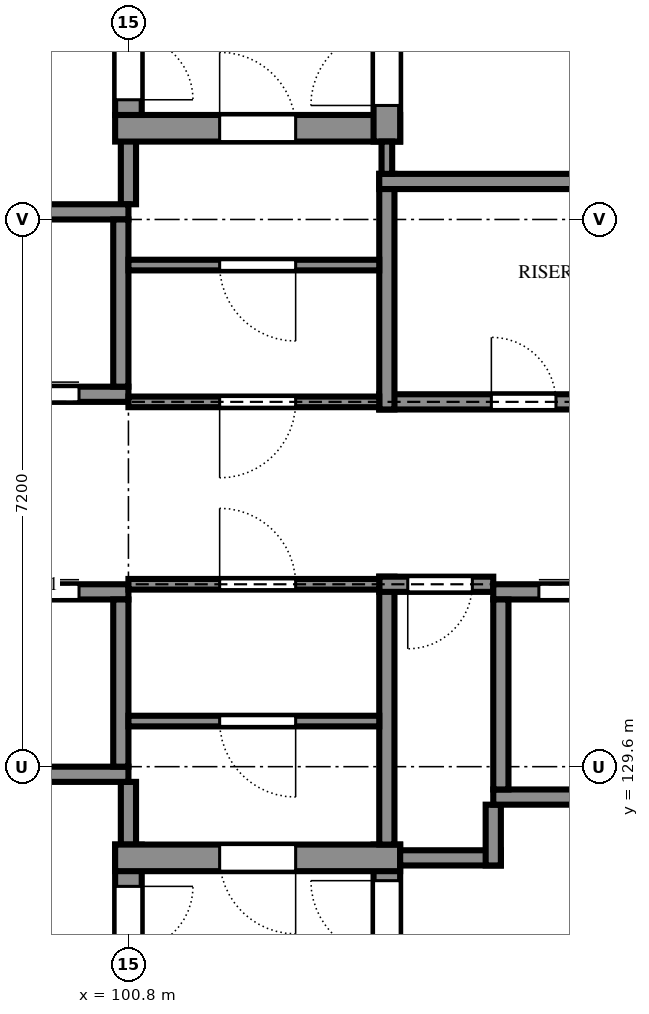
"""IFC4 building model, lengths in metres.
Left out: names, types, materials, properties, quantities, classifications, styles, units other than length and angle.
Written with IfcOpenShell. Run it as: python <this file> out.ifc"""

import sys

from ifc_helpers import new_model, si_unit, direction, frame, frame_2d, origin, place, context, subcontext, project, spatial, rectangle, extrude, element, fill, save


model = new_model("IFC4")
c1 = context("Model", 3, precision=1e-05, world=origin(), true_north=direction((0.0, 1.0)))
c2 = subcontext(c1, "Body", "Model", "MODEL_VIEW")
j1 = project(units=[si_unit("LENGTHUNIT", "METRE"), si_unit("PLANEANGLEUNIT", "RADIAN")], contexts=[c1])
p1 = place(None, origin())
s1 = spatial("IfcSite", under=j1, at=p1, CompositionType="ELEMENT")
p2 = place(p1, origin())
s2 = spatial("IfcBuilding", under=s1, at=p2, CompositionType="ELEMENT")
p3 = place(p2, frame((0.0, 0.0, 21.6)))
s3 = spatial("IfcBuildingStorey", under=s2, at=p3, CompositionType="ELEMENT", Elevation=21.6)
p4 = place(p3, frame((104.2, 125.1, 0.0), z_axis=(0.0, 0.0, 1.0), x_axis=(0.0, 1.0, 0.0)))
e1 = element("IfcWall", 1, at=p4, inside=s3, PredefinedType="SHEAR", context=c2, shape_type="SweptSolid", body=[
    extrude(rectangle(XDim=3.475, YDim=0.35, at=frame_2d((1.737, 0.0))), origin(), (0.0, 0.0, 1.0), 3.6),
])
p5 = place(p4, frame((2.0, 0.0, 0.0)))
e2 = element("IfcOpeningElement", 2, at=p5, cuts=e1, PredefinedType="OPENING", context=c2, shape_type="SweptSolid", body=[
    extrude(rectangle(XDim=1.0, YDim=2.1, at=frame_2d((0.5, 1.05))), frame((0.0, 0.185, 0.0), z_axis=(0.0, -1.0, 0.0), x_axis=(1.0, 0.0, 0.0)), (0.0, 0.0, 1.0), 0.37),
])
p6 = place(p3, frame((100.8, 128.575, 0.0), z_axis=(0.0, 0.0, 1.0), x_axis=(0.0, -1.0, 0.0)))
e3 = element("IfcWall", 3, at=p6, inside=s3, PredefinedType="SHEAR", context=c2, shape_type="SweptSolid", body=[
    extrude(rectangle(XDim=6.35, YDim=0.35, at=frame_2d((3.175, 0.0))), origin(), (0.0, 0.0, 1.0), 3.6),
])
p7 = place(p6, frame((0.55, 0.0, 0.0)))
e4 = element("IfcOpeningElement", 4, at=p7, cuts=e3, PredefinedType="OPENING", context=c2, shape_type="SweptSolid", body=[
    extrude(rectangle(XDim=0.85, YDim=2.1, at=frame_2d((0.425, 1.05))), frame((0.0, 0.185, 0.0), z_axis=(0.0, -1.0, 0.0), x_axis=(1.0, 0.0, 0.0)), (0.0, 0.0, 1.0), 0.37),
])
p8 = place(p3, frame((100.8, 128.575, 0.0), z_axis=(0.0, 0.0, 1.0), x_axis=(0.0, 1.0, 0.0)))
e5 = element("IfcWall", 5, at=p8, inside=s3, PredefinedType="SHEAR", context=c2, shape_type="SweptSolid", body=[
    extrude(rectangle(XDim=0.825, YDim=0.2, at=frame_2d((0.413, 0.0))), origin(), (0.0, 0.0, 1.0), 3.6),
])
p9 = place(p3, frame((104.375, 128.4, 0.0), z_axis=(0.0, 0.0, 1.0), x_axis=(-1.0, 0.0, 0.0)))
e6 = element("IfcWall", 6, at=p9, inside=s3, PredefinedType="SHEAR", context=c2, shape_type="SweptSolid", body=[
    extrude(rectangle(XDim=3.75, YDim=0.35, at=frame_2d((1.875, 0.0))), origin(), (0.0, 0.0, 1.0), 3.6),
])
p10 = place(p9, frame((1.375, 0.0, 0.0)))
e7 = element("IfcOpeningElement", 7, at=p10, cuts=e6, PredefinedType="OPENING", context=c2, shape_type="SweptSolid", body=[
    extrude(rectangle(XDim=1.0, YDim=2.1, at=frame_2d((0.5, 1.05))), frame((0.0, 0.185, 0.0), z_axis=(0.0, -1.0, 0.0), x_axis=(1.0, 0.0, 0.0)), (0.0, 0.0, 1.0), 0.37),
])
p11 = place(p3, frame((104.375, 128.4, 0.0), z_axis=(0.0, 0.0, 1.0), x_axis=(1.0, 0.0, 0.0)))
e8 = element("IfcWall", 8, at=p11, inside=s3, PredefinedType="SHEAR", context=c2, shape_type="SweptSolid", body=[
    extrude(rectangle(XDim=1.325, YDim=0.2, at=frame_2d((0.663, 0.0))), origin(), (0.0, 0.0, 1.0), 3.6),
])
p12 = place(p3, frame((105.6, 128.3, 0.0), z_axis=(0.0, 0.0, 1.0), x_axis=(0.0, 1.0, 0.0)))
e9 = element("IfcWall", 9, at=p12, inside=s3, PredefinedType="SHEAR", context=c2, shape_type="SweptSolid", body=[
    extrude(rectangle(XDim=0.8, YDim=0.2, at=frame_2d((0.4, 0.0))), origin(), (0.0, 0.0, 1.0), 3.6),
])
p13 = place(p3, frame((104.2, 132.1, 0.0), z_axis=(0.0, 0.0, 1.0), x_axis=(0.0, -1.0, 0.0)))
e10 = element("IfcWall", 10, at=p13, inside=s3, PredefinedType="SHEAR", context=c2, shape_type="SweptSolid", body=[
    extrude(rectangle(XDim=3.525, YDim=0.2, at=frame_2d((1.763, 0.0))), origin(), (0.0, 0.0, 1.0), 3.6),
])
p14 = place(p3, frame((105.6, 132.0, 0.0), z_axis=(0.0, 0.0, 1.0), x_axis=(-1.0, 0.0, 0.0)))
e11 = element("IfcWall", 11, at=p14, inside=s3, PredefinedType="SHEAR", context=c2, shape_type="SweptSolid", body=[
    extrude(rectangle(XDim=1.5, YDim=0.2, at=frame_2d((0.75, 0.0))), origin(), (0.0, 0.0, 1.0), 3.6),
])
p15 = place(p14, frame((0.275, 0.0, 0.0)))
e12 = element("IfcOpeningElement", 12, at=p15, cuts=e11, PredefinedType="OPENING", context=c2, shape_type="SweptSolid", body=[
    extrude(rectangle(XDim=0.85, YDim=2.1, at=frame_2d((0.425, 1.05))), frame((0.0, 0.11, 0.0), z_axis=(0.0, -1.0, 0.0), x_axis=(1.0, 0.0, 0.0)), (0.0, 0.0, 1.0), 0.22),
])
p16 = place(p3, frame((104.1, 134.4, 0.0), z_axis=(0.0, 0.0, 1.0), x_axis=(1.0, 0.0, 0.0)))
e13 = element("IfcWall", 13, at=p16, inside=s3, PredefinedType="SHEAR", context=c2, shape_type="SweptSolid", body=[
    extrude(rectangle(XDim=4.1, YDim=0.2, at=frame_2d((2.05, 0.0))), origin(), (0.0, 0.0, 1.0), 3.6),
])
p17 = place(p16, frame((1.475, 0.0, 0.0)))
e14 = element("IfcOpeningElement", 14, at=p17, cuts=e13, PredefinedType="OPENING", context=c2, shape_type="SweptSolid", body=[
    extrude(rectangle(XDim=0.85, YDim=2.1, at=frame_2d((0.425, 1.05))), frame((0.0, 0.11, 0.0), z_axis=(0.0, -1.0, 0.0), x_axis=(1.0, 0.0, 0.0)), (0.0, 0.0, 1.0), 0.22),
])
p18 = place(p3, frame((100.8, 137.0, 0.0), z_axis=(0.0, 0.0, 1.0), x_axis=(0.0, 1.0, 0.0)))
e15 = element("IfcWall", 15, at=p18, inside=s3, PredefinedType="SHEAR", context=c2, shape_type="SweptSolid", body=[
    extrude(rectangle(XDim=1.175, YDim=0.2, at=frame_2d((0.587, 0.0))), origin(), (0.0, 0.0, 1.0), 3.6),
])
p19 = place(p3, frame((104.2, 137.4, 0.0), z_axis=(0.0, 0.0, 1.0), x_axis=(0.0, -1.0, 0.0)))
e16 = element("IfcWall", 16, at=p19, inside=s3, PredefinedType="SHEAR", context=c2, shape_type="SweptSolid", body=[
    extrude(rectangle(XDim=3.1, YDim=0.2, at=frame_2d((1.55, 0.0))), origin(), (0.0, 0.0, 1.0), 3.6),
])
p20 = place(p3, frame((108.2, 137.3, 0.0), z_axis=(0.0, 0.0, 1.0), x_axis=(-1.0, 0.0, 0.0)))
e17 = element("IfcWall", 17, at=p20, inside=s3, PredefinedType="SHEAR", context=c2, shape_type="SweptSolid", body=[
    extrude(rectangle(XDim=4.1, YDim=0.2, at=frame_2d((2.05, 0.0))), origin(), (0.0, 0.0, 1.0), 3.6),
])
p21 = place(p3, frame((100.625, 138.0, 0.0), z_axis=(0.0, 0.0, 1.0), x_axis=(1.0, 0.0, 0.0)))
e18 = element("IfcWall", 18, at=p21, inside=s3, PredefinedType="SHEAR", context=c2, shape_type="SweptSolid", body=[
    extrude(rectangle(XDim=3.75, YDim=0.35, at=frame_2d((1.875, 0.0))), origin(), (0.0, 0.0, 1.0), 3.6),
])
p22 = place(p21, frame((1.375, 0.0, 0.0)))
e19 = element("IfcOpeningElement", 19, at=p22, cuts=e18, PredefinedType="OPENING", context=c2, shape_type="SweptSolid", body=[
    extrude(rectangle(XDim=1.0, YDim=2.1, at=frame_2d((0.5, 1.05))), frame((0.0, 0.185, 0.0), z_axis=(0.0, -1.0, 0.0), x_axis=(1.0, 0.0, 0.0)), (0.0, 0.0, 1.0), 0.37),
])
p23 = place(p3, frame((104.2, 137.825, 0.0), z_axis=(0.0, 0.0, 1.0), x_axis=(0.0, 1.0, 0.0)))
e20 = element("IfcWall", 20, at=p23, inside=s3, PredefinedType="SHEAR", context=c2, shape_type="SweptSolid", body=[
    extrude(rectangle(XDim=3.475, YDim=0.35, at=frame_2d((1.738, 0.0))), origin(), (0.0, 0.0, 1.0), 3.6),
])
p24 = place(p23, frame((0.475, 0.0, 0.0)))
e21 = element("IfcOpeningElement", 21, at=p24, cuts=e20, PredefinedType="OPENING", context=c2, shape_type="SweptSolid", body=[
    extrude(rectangle(XDim=1.0, YDim=2.1, at=frame_2d((0.5, 1.05))), frame((0.0, 0.185, 0.0), z_axis=(0.0, -1.0, 0.0), x_axis=(1.0, 0.0, 0.0)), (0.0, 0.0, 1.0), 0.37),
])
p25 = place(p3, frame((100.8, 144.175, 0.0), z_axis=(0.0, 0.0, 1.0), x_axis=(0.0, -1.0, 0.0)))
e22 = element("IfcWall", 22, at=p25, inside=s3, PredefinedType="SHEAR", context=c2, shape_type="SweptSolid", body=[
    extrude(rectangle(XDim=6.0, YDim=0.35, at=frame_2d((3.0, 0.0))), origin(), (0.0, 0.0, 1.0), 3.6),
])
p26 = place(p25, frame((4.95, 0.0, 0.0)))
e23 = element("IfcOpeningElement", 23, at=p26, cuts=e22, PredefinedType="OPENING", context=c2, shape_type="SweptSolid", body=[
    extrude(rectangle(XDim=0.85, YDim=2.1, at=frame_2d((0.425, 1.05))), frame((0.0, 0.185, 0.0), z_axis=(0.0, -1.0, 0.0), x_axis=(1.0, 0.0, 0.0)), (0.0, 0.0, 1.0), 0.37),
])
p27 = place(p3, frame((98.4, 129.5, 0.0), z_axis=(0.0, 0.0, 1.0), x_axis=(1.0, 0.0, 0.0)))
e24 = element("IfcWall", 24, at=p27, inside=s3, PredefinedType="SHEAR", context=c2, shape_type="SweptSolid", body=[
    extrude(rectangle(XDim=2.4, YDim=0.2, at=frame_2d((1.2, 0.0))), origin(), (0.0, 0.0, 1.0), 3.6),
])
p28 = place(p3, frame((98.4, 131.9, 0.0), z_axis=(0.0, 0.0, 1.0), x_axis=(1.0, 0.0, 0.0)))
e25 = element("IfcWall", 25, at=p28, inside=s3, PredefinedType="SHEAR", context=c2, shape_type="SweptSolid", body=[
    extrude(rectangle(XDim=2.4, YDim=0.2, at=frame_2d((1.2, 0.0))), origin(), (0.0, 0.0, 1.0), 3.6),
])
p29 = place(p28, frame((0.65, 0.0, 0.0)))
e26 = element("IfcOpeningElement", 26, at=p29, cuts=e25, PredefinedType="OPENING", context=c2, shape_type="SweptSolid", body=[
    extrude(rectangle(XDim=1.1, YDim=2.1, at=frame_2d((0.55, 1.05))), frame((0.0, 0.11, 0.0), z_axis=(0.0, -1.0, 0.0), x_axis=(1.0, 0.0, 0.0)), (0.0, 0.0, 1.0), 0.22),
])
p30 = place(p3, frame((100.7, 129.6, 0.0), z_axis=(0.0, 0.0, 1.0), x_axis=(0.0, 1.0, 0.0)))
e27 = element("IfcWall", 27, at=p30, inside=s3, PredefinedType="SHEAR", context=c2, shape_type="SweptSolid", body=[
    extrude(rectangle(XDim=2.2, YDim=0.2, at=frame_2d((1.1, 0.0))), origin(), (0.0, 0.0, 1.0), 3.6),
])
p31 = place(p3, frame((98.4, 134.5, 0.0), z_axis=(0.0, 0.0, 1.0), x_axis=(1.0, 0.0, 0.0)))
e28 = element("IfcWall", 28, at=p31, inside=s3, PredefinedType="SHEAR", context=c2, shape_type="SweptSolid", body=[
    extrude(rectangle(XDim=2.4, YDim=0.2, at=frame_2d((1.2, 0.0))), origin(), (0.0, 0.0, 1.0), 3.6),
])
p32 = place(p31, frame((0.65, 0.0, 0.0)))
e29 = element("IfcOpeningElement", 29, at=p32, cuts=e28, PredefinedType="OPENING", context=c2, shape_type="SweptSolid", body=[
    extrude(rectangle(XDim=1.1, YDim=2.1, at=frame_2d((0.55, 1.05))), frame((0.0, 0.11, 0.0), z_axis=(0.0, -1.0, 0.0), x_axis=(1.0, 0.0, 0.0)), (0.0, 0.0, 1.0), 0.22),
])
p33 = place(p3, frame((98.4, 136.9, 0.0), z_axis=(0.0, 0.0, 1.0), x_axis=(1.0, 0.0, 0.0)))
e30 = element("IfcWall", 30, at=p33, inside=s3, PredefinedType="SHEAR", context=c2, shape_type="SweptSolid", body=[
    extrude(rectangle(XDim=2.4, YDim=0.2, at=frame_2d((1.2, 0.0))), origin(), (0.0, 0.0, 1.0), 3.6),
])
p34 = place(p3, frame((100.7, 134.6, 0.0), z_axis=(0.0, 0.0, 1.0), x_axis=(0.0, 1.0, 0.0)))
e31 = element("IfcWall", 31, at=p34, inside=s3, PredefinedType="SHEAR", context=c2, shape_type="SweptSolid", body=[
    extrude(rectangle(XDim=2.2, YDim=0.2, at=frame_2d((1.1, 0.0))), origin(), (0.0, 0.0, 1.0), 3.6),
])
p35 = place(p3, frame((105.6, 129.2, 0.0), z_axis=(0.0, 0.0, 1.0), x_axis=(1.0, 0.0, 0.0)))
e32 = element("IfcWall", 32, at=p35, inside=s3, PredefinedType="SHEAR", context=c2, shape_type="SweptSolid", body=[
    extrude(rectangle(XDim=2.4, YDim=0.2, at=frame_2d((1.2, 0.0))), origin(), (0.0, 0.0, 1.0), 3.6),
])
p36 = place(p3, frame((105.6, 131.9, 0.0), z_axis=(0.0, 0.0, 1.0), x_axis=(1.0, 0.0, 0.0)))
e33 = element("IfcWall", 33, at=p36, inside=s3, PredefinedType="SHEAR", context=c2, shape_type="SweptSolid", body=[
    extrude(rectangle(XDim=2.4, YDim=0.2, at=frame_2d((1.2, 0.0))), origin(), (0.0, 0.0, 1.0), 3.6),
])
p37 = place(p36, frame((0.6, 0.0, 0.0)))
e34 = element("IfcOpeningElement", 34, at=p37, cuts=e33, PredefinedType="OPENING", context=c2, shape_type="SweptSolid", body=[
    extrude(rectangle(XDim=1.2, YDim=2.1, at=frame_2d((0.6, 1.05))), frame((0.0, 0.11, 0.0), z_axis=(0.0, -1.0, 0.0), x_axis=(1.0, 0.0, 0.0)), (0.0, 0.0, 1.0), 0.22),
])
p38 = place(p3, frame((105.7, 129.3, 0.0), z_axis=(0.0, 0.0, 1.0), x_axis=(0.0, 1.0, 0.0)))
e35 = element("IfcWall", 35, at=p38, inside=s3, PredefinedType="SHEAR", context=c2, shape_type="SweptSolid", body=[
    extrude(rectangle(XDim=2.5, YDim=0.2, at=frame_2d((1.25, 0.0))), origin(), (0.0, 0.0, 1.0), 3.6),
])
p39 = place(p3, frame((100.8, 130.2, 0.0), z_axis=(0.0, 0.0, 1.0), x_axis=(1.0, 0.0, 0.0)))
e36 = element("IfcWall", 36, at=p39, inside=s3, PredefinedType="PARTITIONING", context=c2, shape_type="SweptSolid", body=[
    extrude(rectangle(XDim=3.3, YDim=0.14, at=frame_2d((1.65, 0.0))), origin(), (0.0, 0.0, 1.0), 3.46),
])
p40 = place(p39, frame((1.2, 0.0, 0.0)))
e37 = element("IfcOpeningElement", 37, at=p40, cuts=e36, PredefinedType="OPENING", context=c2, shape_type="SweptSolid", body=[
    extrude(rectangle(XDim=1.0, YDim=2.1, at=frame_2d((0.5, 1.05))), frame((0.0, 0.08, 0.0), z_axis=(0.0, -1.0, 0.0), x_axis=(1.0, 0.0, 0.0)), (0.0, 0.0, 1.0), 0.16),
])
p41 = place(p3, frame((100.8, 132.0, 0.0), z_axis=(0.0, 0.0, 1.0), x_axis=(1.0, 0.0, 0.0)))
e38 = element("IfcWall", 38, at=p41, inside=s3, PredefinedType="PARTITIONING", context=c2, shape_type="SweptSolid", body=[
    extrude(rectangle(XDim=3.3, YDim=0.14, at=frame_2d((1.65, 0.0))), origin(), (0.0, 0.0, 1.0), 3.46),
])
p42 = place(p41, frame((1.2, 0.0, 0.0)))
e39 = element("IfcOpeningElement", 39, at=p42, cuts=e38, PredefinedType="OPENING", context=c2, shape_type="SweptSolid", body=[
    extrude(rectangle(XDim=1.0, YDim=2.1, at=frame_2d((0.5, 1.05))), frame((0.0, 0.08, 0.0), z_axis=(0.0, -1.0, 0.0), x_axis=(1.0, 0.0, 0.0)), (0.0, 0.0, 1.0), 0.16),
])
p43 = place(p3, frame((100.8, 134.4, 0.0), z_axis=(0.0, 0.0, 1.0), x_axis=(1.0, 0.0, 0.0)))
e40 = element("IfcWall", 40, at=p43, inside=s3, PredefinedType="PARTITIONING", context=c2, shape_type="SweptSolid", body=[
    extrude(rectangle(XDim=3.3, YDim=0.14, at=frame_2d((1.65, 0.0))), origin(), (0.0, 0.0, 1.0), 3.46),
])
p44 = place(p43, frame((1.2, 0.0, 0.0)))
e41 = element("IfcOpeningElement", 41, at=p44, cuts=e40, PredefinedType="OPENING", context=c2, shape_type="SweptSolid", body=[
    extrude(rectangle(XDim=1.0, YDim=2.1, at=frame_2d((0.5, 1.05))), frame((0.0, 0.08, 0.0), z_axis=(0.0, -1.0, 0.0), x_axis=(1.0, 0.0, 0.0)), (0.0, 0.0, 1.0), 0.16),
])
p45 = place(p3, frame((100.8, 136.2, 0.0), z_axis=(0.0, 0.0, 1.0), x_axis=(1.0, 0.0, 0.0)))
e42 = element("IfcWall", 42, at=p45, inside=s3, PredefinedType="PARTITIONING", context=c2, shape_type="SweptSolid", body=[
    extrude(rectangle(XDim=3.3, YDim=0.14, at=frame_2d((1.65, 0.0))), origin(), (0.0, 0.0, 1.0), 3.46),
])
p46 = place(p45, frame((1.2, 0.0, 0.0)))
e43 = element("IfcOpeningElement", 43, at=p46, cuts=e42, PredefinedType="OPENING", context=c2, shape_type="SweptSolid", body=[
    extrude(rectangle(XDim=1.0, YDim=2.1, at=frame_2d((0.5, 1.05))), frame((0.0, 0.08, 0.0), z_axis=(0.0, -1.0, 0.0), x_axis=(1.0, 0.0, 0.0)), (0.0, 0.0, 1.0), 0.16),
])
p47 = place(p3, frame((104.2, 137.4, 0.0), z_axis=(0.0, 0.0, 1.0), x_axis=(0.0, 1.0, 0.0)))
e44 = element("IfcWall", 44, at=p47, inside=s3, PredefinedType="PARTITIONING", context=c2, shape_type="SweptSolid", body=[
    extrude(rectangle(XDim=0.425, YDim=0.14, at=frame_2d((0.212, 0.0))), origin(), (0.0, 0.0, 1.0), 3.46),
])
p48 = place(p29, origin())
e45 = element("IfcDoor", 45, at=p48, inside=s3, OperationType="SLIDING_TO_LEFT", PredefinedType="DOOR", context=c2, shape_type="SweptSolid", body=[
    extrude(rectangle(XDim=1.1, YDim=2.1, at=frame_2d((0.55, 1.05))), frame((0.0, 0.025, 0.0), z_axis=(0.0, -1.0, 0.0), x_axis=(1.0, 0.0, 0.0)), (0.0, 0.0, 1.0), 0.05),
])
fill(e26, e45)
p49 = place(p32, origin())
e46 = element("IfcDoor", 46, at=p49, inside=s3, OperationType="SLIDING_TO_LEFT", PredefinedType="DOOR", context=c2, shape_type="SweptSolid", body=[
    extrude(rectangle(XDim=1.1, YDim=2.1, at=frame_2d((0.55, 1.05))), frame((0.0, 0.025, 0.0), z_axis=(0.0, -1.0, 0.0), x_axis=(1.0, 0.0, 0.0)), (0.0, 0.0, 1.0), 0.05),
])
fill(e29, e46)
p50 = place(p37, origin())
e47 = element("IfcDoor", 47, at=p50, inside=s3, OperationType="SLIDING_TO_LEFT", PredefinedType="DOOR", context=c2, shape_type="SweptSolid", body=[
    extrude(rectangle(XDim=1.2, YDim=2.1, at=frame_2d((0.6, 1.05))), frame((0.0, 0.025, 0.0), z_axis=(0.0, -1.0, 0.0), x_axis=(1.0, 0.0, 0.0)), (0.0, 0.0, 1.0), 0.05),
])
fill(e34, e47)
p51 = place(p40, frame((1.0, 0.0, 0.0), z_axis=(0.0, 0.0, 1.0), x_axis=(-1.0, 0.0, 0.0)))
e48 = element("IfcDoor", 48, at=p51, inside=s3, OperationType="SINGLE_SWING_RIGHT", PredefinedType="DOOR", context=c2, shape_type="SweptSolid", body=[
    extrude(rectangle(XDim=1.0, YDim=2.1, at=frame_2d((0.5, 1.05))), frame((0.0, 0.025, 0.0), z_axis=(0.0, -1.0, 0.0), x_axis=(1.0, 0.0, 0.0)), (0.0, 0.0, 1.0), 0.05),
])
fill(e37, e48)
p52 = place(p42, origin())
e49 = element("IfcDoor", 49, at=p52, inside=s3, OperationType="SINGLE_SWING_RIGHT", PredefinedType="DOOR", context=c2, shape_type="SweptSolid", body=[
    extrude(rectangle(XDim=1.0, YDim=2.1, at=frame_2d((0.5, 1.05))), frame((0.0, 0.025, 0.0), z_axis=(0.0, -1.0, 0.0), x_axis=(1.0, 0.0, 0.0)), (0.0, 0.0, 1.0), 0.05),
])
fill(e39, e49)
p53 = place(p44, frame((1.0, 0.0, 0.0), z_axis=(0.0, 0.0, 1.0), x_axis=(-1.0, 0.0, 0.0)))
e50 = element("IfcDoor", 50, at=p53, inside=s3, OperationType="SINGLE_SWING_LEFT", PredefinedType="DOOR", context=c2, shape_type="SweptSolid", body=[
    extrude(rectangle(XDim=1.0, YDim=2.1, at=frame_2d((0.5, 1.05))), frame((0.0, 0.025, 0.0), z_axis=(0.0, -1.0, 0.0), x_axis=(1.0, 0.0, 0.0)), (0.0, 0.0, 1.0), 0.05),
])
fill(e41, e50)
p54 = place(p46, frame((1.0, 0.0, 0.0), z_axis=(0.0, 0.0, 1.0), x_axis=(-1.0, 0.0, 0.0)))
e51 = element("IfcDoor", 51, at=p54, inside=s3, OperationType="SINGLE_SWING_RIGHT", PredefinedType="DOOR", context=c2, shape_type="SweptSolid", body=[
    extrude(rectangle(XDim=1.0, YDim=2.1, at=frame_2d((0.5, 1.05))), frame((0.0, 0.025, 0.0), z_axis=(0.0, -1.0, 0.0), x_axis=(1.0, 0.0, 0.0)), (0.0, 0.0, 1.0), 0.05),
])
fill(e43, e51)
p55 = place(p10, origin())
e52 = element("IfcDoor", 52, at=p55, inside=s3, OperationType="SINGLE_SWING_RIGHT", PredefinedType="DOOR", context=c2, shape_type="SweptSolid", body=[
    extrude(rectangle(XDim=1.0, YDim=2.1, at=frame_2d((0.5, 1.05))), frame((0.0, 0.025, 0.0), z_axis=(0.0, -1.0, 0.0), x_axis=(1.0, 0.0, 0.0)), (0.0, 0.0, 1.0), 0.05),
])
fill(e7, e52)
p56 = place(p7, origin())
e53 = element("IfcDoor", 53, at=p56, inside=s3, OperationType="SINGLE_SWING_RIGHT", PredefinedType="DOOR", context=c2, shape_type="SweptSolid", body=[
    extrude(rectangle(XDim=0.85, YDim=2.1, at=frame_2d((0.425, 1.05))), frame((0.0, 0.025, 0.0), z_axis=(0.0, -1.0, 0.0), x_axis=(1.0, 0.0, 0.0)), (0.0, 0.0, 1.0), 0.05),
])
fill(e4, e53)
p57 = place(p5, origin())
e54 = element("IfcDoor", 54, at=p57, inside=s3, OperationType="SINGLE_SWING_LEFT", PredefinedType="DOOR", context=c2, shape_type="SweptSolid", body=[
    extrude(rectangle(XDim=1.0, YDim=2.1, at=frame_2d((0.5, 1.05))), frame((0.0, 0.025, 0.0), z_axis=(0.0, -1.0, 0.0), x_axis=(1.0, 0.0, 0.0)), (0.0, 0.0, 1.0), 0.05),
])
fill(e2, e54)
p58 = place(p15, origin())
e55 = element("IfcDoor", 55, at=p58, inside=s3, OperationType="SINGLE_SWING_LEFT", PredefinedType="DOOR", context=c2, shape_type="SweptSolid", body=[
    extrude(rectangle(XDim=0.85, YDim=2.1, at=frame_2d((0.425, 1.05))), frame((0.0, 0.025, 0.0), z_axis=(0.0, -1.0, 0.0), x_axis=(1.0, 0.0, 0.0)), (0.0, 0.0, 1.0), 0.05),
])
fill(e12, e55)
p59 = place(p17, origin())
e56 = element("IfcDoor", 56, at=p59, inside=s3, OperationType="SINGLE_SWING_RIGHT", PredefinedType="DOOR", context=c2, shape_type="SweptSolid", body=[
    extrude(rectangle(XDim=0.85, YDim=2.1, at=frame_2d((0.425, 1.05))), frame((0.0, 0.025, 0.0), z_axis=(0.0, -1.0, 0.0), x_axis=(1.0, 0.0, 0.0)), (0.0, 0.0, 1.0), 0.05),
])
fill(e14, e56)
p60 = place(p22, origin())
e57 = element("IfcDoor", 57, at=p60, inside=s3, OperationType="SINGLE_SWING_RIGHT", PredefinedType="DOOR", context=c2, shape_type="SweptSolid", body=[
    extrude(rectangle(XDim=1.0, YDim=2.1, at=frame_2d((0.5, 1.05))), frame((0.0, 0.025, 0.0), z_axis=(0.0, -1.0, 0.0), x_axis=(1.0, 0.0, 0.0)), (0.0, 0.0, 1.0), 0.05),
])
fill(e19, e57)
p61 = place(p26, origin())
e58 = element("IfcDoor", 58, at=p61, inside=s3, OperationType="SINGLE_SWING_LEFT", PredefinedType="DOOR", context=c2, shape_type="SweptSolid", body=[
    extrude(rectangle(XDim=0.85, YDim=2.1, at=frame_2d((0.425, 1.05))), frame((0.0, 0.025, 0.0), z_axis=(0.0, -1.0, 0.0), x_axis=(1.0, 0.0, 0.0)), (0.0, 0.0, 1.0), 0.05),
])
fill(e23, e58)
p62 = place(p24, origin())
e59 = element("IfcDoor", 59, at=p62, inside=s3, OperationType="SINGLE_SWING_RIGHT", PredefinedType="DOOR", context=c2, shape_type="SweptSolid", body=[
    extrude(rectangle(XDim=1.0, YDim=2.1, at=frame_2d((0.5, 1.05))), frame((0.0, 0.025, 0.0), z_axis=(0.0, -1.0, 0.0), x_axis=(1.0, 0.0, 0.0)), (0.0, 0.0, 1.0), 0.05),
])
fill(e21, e59)
save(model, sys.argv[1])
